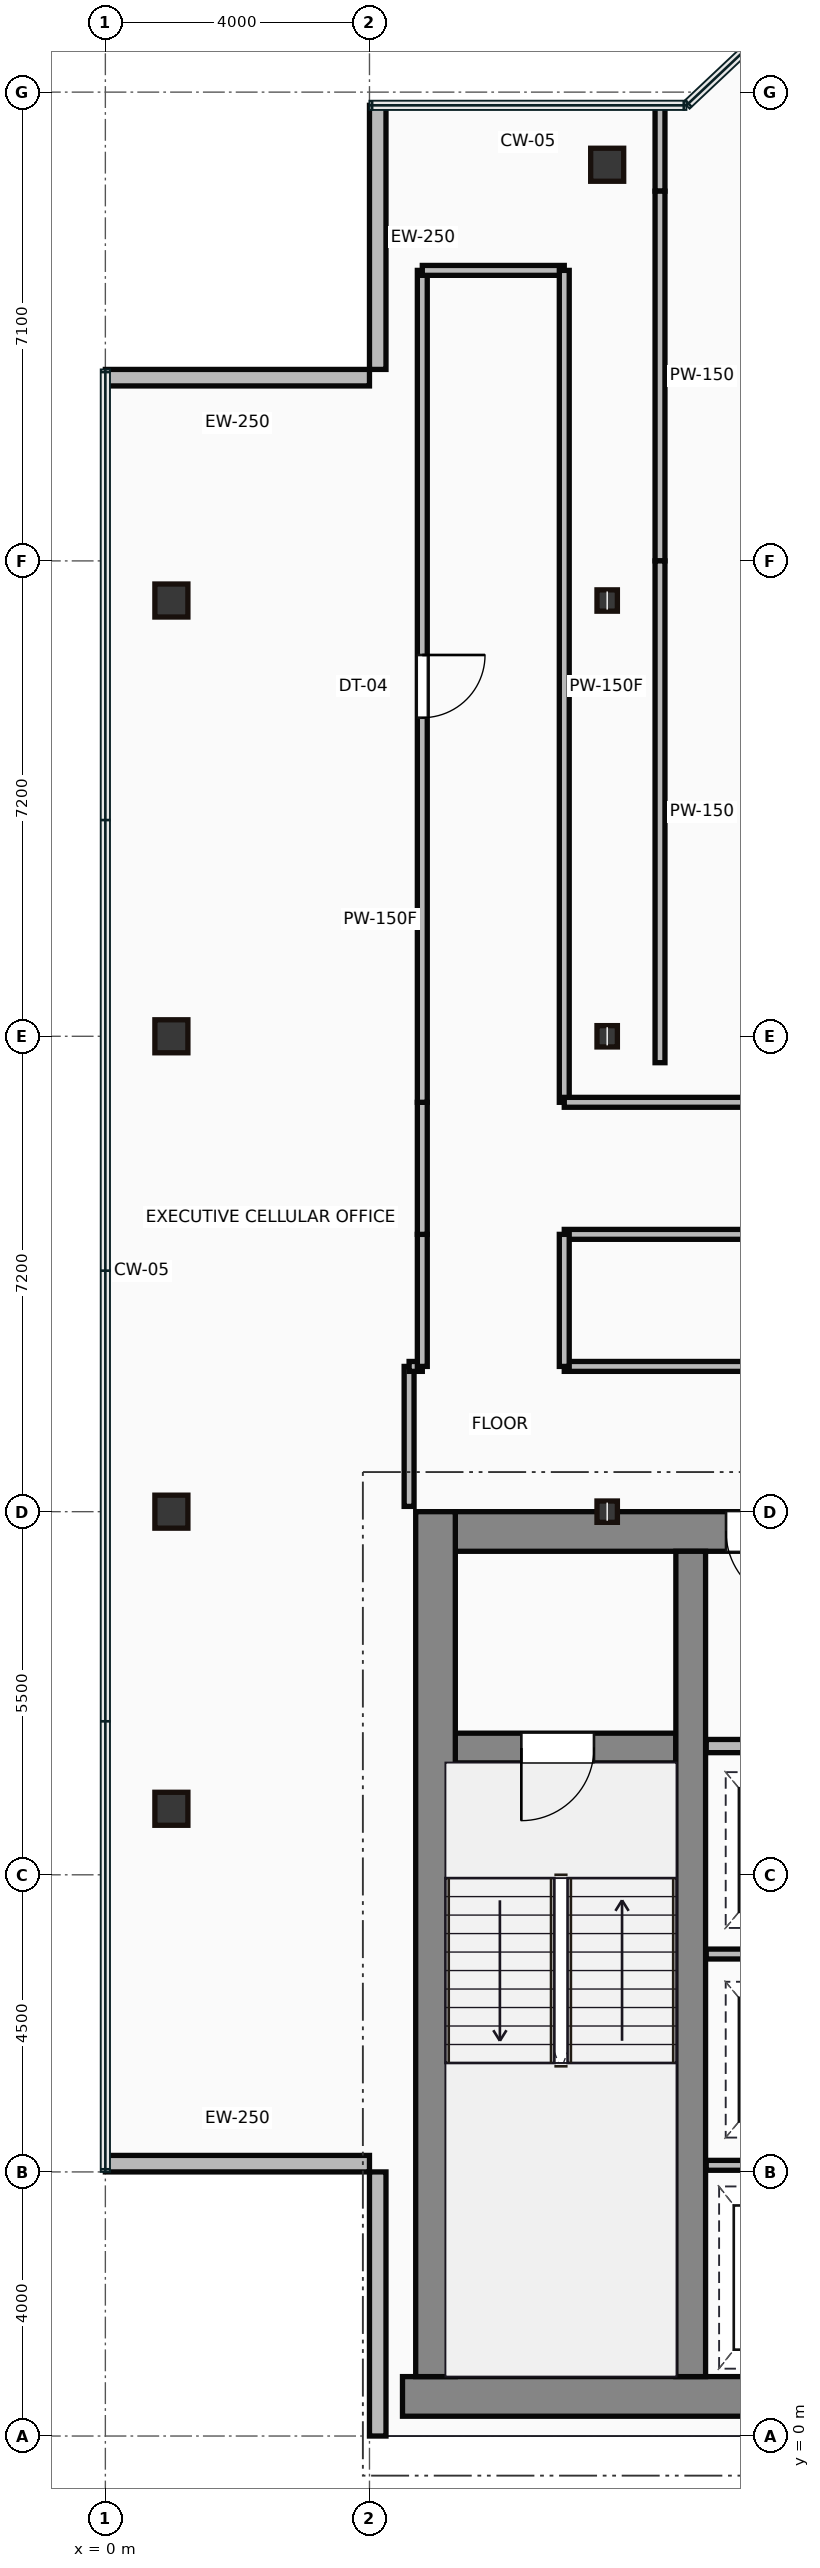
"""IFC4 building model, lengths in metres.
Left out: names, types, materials, properties, quantities, classifications, styles, units other than length and angle.
Written with IfcOpenShell. Run it as: python <this file> out.ifc"""

import sys

from ifc_helpers import new_model, si_unit, direction, frame, frame_2d, origin, origin_2d, place, context, subcontext, project, spatial, rectangle, hollow_rectangle, i_section, extrude, source, transform, mapped, element, fill, save


model = new_model("IFC4")
c1 = context("Model", 3, precision=1e-05, world=origin(), true_north=direction((0.0, 1.0)))
c2 = subcontext(c1, "Body", "Model", "MODEL_VIEW")
j1 = project(units=[si_unit("LENGTHUNIT", "METRE"), si_unit("PLANEANGLEUNIT", "RADIAN")], contexts=[c1])
p1 = place(None, origin())
s1 = spatial("IfcSite", under=j1, at=p1, CompositionType="ELEMENT")
p2 = place(p1, origin())
s2 = spatial("IfcBuilding", under=s1, at=p2, CompositionType="ELEMENT")
p3 = place(p2, frame((0.0, 0.0, 262.45)))
s3 = spatial("IfcBuildingStorey", under=s2, at=p3, CompositionType="ELEMENT", Elevation=262.45)
m1 = source(origin(), c2, "Body", "SweptSolid", [
    extrude(rectangle(XDim=29.5, YDim=0.6, at=frame_2d((14.75, 0.0))), origin(), (0.0, 0.0, 1.0), 3.65),
])
p4 = place(p3, frame((4.5, 0.6, 0.0), z_axis=(0.0, 0.0, 1.0), x_axis=(1.0, 0.0, 0.0)))
e1 = element("IfcWall", 1, at=p4, inside=s3, PredefinedType="SHEAR", context=c2, shape_type="MappedRepresentation", body=[
    mapped(m1, transform((0.0, 0.0, 0.0))),
])
m2 = source(origin(), c2, "Body", "SweptSolid", [
    extrude(rectangle(XDim=13.1, YDim=0.6, at=frame_2d((6.55, 0.0))), origin(), (0.0, 0.0, 1.0), 3.65),
])
p5 = place(p3, frame((5.0, 0.9, 0.0), z_axis=(0.0, 0.0, 1.0), x_axis=(0.0, 1.0, 0.0)))
e2 = element("IfcWall", 2, at=p5, inside=s3, PredefinedType="SHEAR", context=c2, shape_type="MappedRepresentation", body=[
    mapped(m2, transform((0.0, 0.0, 0.0))),
])
m3 = source(origin(), c2, "Body", "SweptSolid", [
    extrude(rectangle(XDim=9.1, YDim=0.6, at=frame_2d((4.55, 0.0))), origin(), (0.0, 0.0, 1.0), 3.65),
])
p6 = place(p3, frame((5.3, 13.7, 0.0), z_axis=(0.0, 0.0, 1.0), x_axis=(1.0, 0.0, 0.0)))
e3 = element("IfcWall", 3, at=p6, inside=s3, PredefinedType="SHEAR", context=c2, shape_type="MappedRepresentation", body=[
    mapped(m3, transform((0.0, 0.0, 0.0))),
])
p7 = place(p6, frame((4.1, 0.0, 0.0)))
e4 = element("IfcOpeningElement", 4, at=p7, cuts=e3, PredefinedType="OPENING", context=c2, shape_type="SweptSolid", body=[
    extrude(rectangle(XDim=1.1, YDim=2.15, at=frame_2d((0.55, 1.075))), frame((0.0, 0.31, 0.0), z_axis=(0.0, -1.0, 0.0), x_axis=(1.0, 0.0, 0.0)), (0.0, 0.0, 1.0), 0.62),
])
m4 = source(origin(), c2, "Body", "SweptSolid", [
    extrude(rectangle(XDim=12.5, YDim=0.45, at=frame_2d((6.25, 0.0))), origin(), (0.0, 0.0, 1.0), 3.65),
])
p8 = place(p3, frame((8.865, 0.9, 0.0), z_axis=(0.0, 0.0, 1.0), x_axis=(0.0, 1.0, 0.0)))
e5 = element("IfcWall", 5, at=p8, inside=s3, PredefinedType="SHEAR", context=c2, shape_type="MappedRepresentation", body=[
    mapped(m4, transform((0.0, 0.0, 0.0))),
])
m5 = source(origin(), c2, "Body", "SweptSolid", [
    extrude(rectangle(XDim=3.39, YDim=0.45, at=frame_2d((1.695, 0.0))), origin(), (0.0, 0.0, 1.0), 3.65),
])
p9 = place(p3, frame((5.25, 10.42, 0.0), z_axis=(0.0, 0.0, 1.0), x_axis=(1.0, 0.0, 0.0)))
e6 = element("IfcWall", 6, at=p9, inside=s3, PredefinedType="SHEAR", context=c2, shape_type="MappedRepresentation", body=[
    mapped(m5, transform((0.0, 0.0, 0.0))),
])
p10 = place(p9, frame((1.05, 0.0, 0.0)))
e7 = element("IfcOpeningElement", 7, at=p10, cuts=e6, PredefinedType="OPENING", context=c2, shape_type="SweptSolid", body=[
    extrude(rectangle(XDim=1.1, YDim=2.15, at=frame_2d((0.55, 1.075))), frame((0.0, 0.235, 0.0), z_axis=(0.0, -1.0, 0.0), x_axis=(1.0, 0.0, 0.0)), (0.0, 0.0, 1.0), 0.47),
])
m6 = source(origin(), c2, "Body", "SweptSolid", [
    extrude(hollow_rectangle(XDim=0.5, YDim=0.5, WallThickness=0.022, at=origin_2d()), origin(), (0.0, 0.0, 1.0), 3.65),
])
for number, where, z_axis, x_axis in (
    (8, (1.0, 9.5, 0.0), (0.0, 0.0, 1.0), (1.0, 0.0, 0.0)),
    (9, (1.0, 14.0, 0.0), (0.0, 0.0, 1.0), (1.0, 0.0, 0.0)),
    (10, (1.0, 21.2, 0.0), (0.0, 0.0, 1.0), (1.0, 0.0, 0.0)),
    (11, (1.0, 27.8, 0.0), (0.0, 0.0, 1.0), (1.0, 0.0, 0.0)),
):
    element("IfcColumn", number, at=place(p3, frame(where, z_axis=z_axis, x_axis=x_axis)), inside=s3, PredefinedType="COLUMN", context=c2, shape_type="MappedRepresentation", body=[
        mapped(m6, transform((0.0, 0.0, 0.0))),
    ])
m7 = source(origin(), c2, "Body", "SweptSolid", [
    extrude(i_section(OverallWidth=0.309, OverallDepth=0.323, WebThickness=0.014, FlangeThickness=0.023, at=origin_2d()), origin(), (0.0, 0.0, 1.0), 3.65),
])
for number, where, z_axis, x_axis in (
    (12, (7.6, 14.0, 0.0), (0.0, 0.0, 1.0), (1.0, 0.0, 0.0)),
    (13, (7.6, 21.2, 0.0), (0.0, 0.0, 1.0), (1.0, 0.0, 0.0)),
    (14, (7.6, 27.8, 0.0), (0.0, 0.0, 1.0), (1.0, 0.0, 0.0)),
):
    element("IfcColumn", number, at=place(p3, frame(where, z_axis=z_axis, x_axis=x_axis)), inside=s3, PredefinedType="COLUMN", context=c2, shape_type="MappedRepresentation", body=[
        mapped(m7, transform((0.0, 0.0, 0.0))),
    ])
p11 = place(p3, frame((7.6, 34.4, 0.0), z_axis=(0.0, 0.0, 1.0), x_axis=(1.0, 0.0, 0.0)))
e15 = element("IfcColumn", 15, at=p11, inside=s3, PredefinedType="COLUMN", context=c2, shape_type="MappedRepresentation", body=[
    mapped(m6, transform((0.0, 0.0, 0.0))),
])
m8 = source(origin(), c2, "Body", "SweptSolid", [
    extrude(rectangle(XDim=4.0, YDim=0.25, at=frame_2d((2.0, 0.0))), origin(), (0.0, 0.0, 1.0), 3.4),
])
for number, where, z_axis, x_axis in (
    (16, (4.125, 35.3, 0.0), (0.0, 0.0, 1.0), (0.0, -1.0, 0.0)),
    (17, (4.0, 31.175, 0.0), (0.0, 0.0, 1.0), (-1.0, 0.0, 0.0)),
    (18, (0.0, 4.125, 0.0), (0.0, 0.0, 1.0), (1.0, 0.0, 0.0)),
    (19, (4.125, 4.0, 0.0), (0.0, 0.0, 1.0), (0.0, -1.0, 0.0)),
):
    element("IfcWall", number, at=place(p3, frame(where, z_axis=z_axis, x_axis=x_axis)), inside=s3, PredefinedType="STANDARD", context=c2, shape_type="MappedRepresentation", body=[
        mapped(m8, transform((0.0, 0.0, 0.0))),
    ])
m9 = source(origin(), c2, "Body", "SweptSolid", [
    extrude(rectangle(XDim=2.35, YDim=0.2, at=frame_2d((1.175, 0.0))), origin(), (0.0, 0.0, 1.0), 3.4),
])
p12 = place(p3, frame((9.1, 10.45, 0.0), z_axis=(0.0, 0.0, 1.0), x_axis=(1.0, 0.0, 0.0)))
e20 = element("IfcWall", 20, at=p12, inside=s3, PredefinedType="PARTITIONING", context=c2, shape_type="MappedRepresentation", body=[
    mapped(m9, transform((0.0, 0.0, 0.0))),
])
p13 = place(p12, frame((0.55, 0.0, 0.0)))
e21 = element("IfcOpeningElement", 21, at=p13, cuts=e20, PredefinedType="OPENING", context=c2, shape_type="SweptSolid", body=[
    extrude(rectangle(XDim=1.1, YDim=2.15, at=frame_2d((0.55, 1.075))), frame((0.0, 0.11, 0.0), z_axis=(0.0, -1.0, 0.0), x_axis=(1.0, 0.0, 0.0)), (0.0, 0.0, 1.0), 0.22),
])
m10 = source(origin(), c2, "Body", "SweptSolid", [
    extrude(rectangle(XDim=2.4, YDim=0.15, at=frame_2d((1.2, 0.0))), origin(), (0.0, 0.0, 1.0), 3.4),
])
for number, where, z_axis, x_axis in (
    (22, (9.1, 4.1, 0.0), (0.0, 0.0, 1.0), (1.0, 0.0, 0.0)),
    (23, (9.1, 7.3, 0.0), (0.0, 0.0, 1.0), (1.0, 0.0, 0.0)),
):
    element("IfcWall", number, at=place(p3, frame(where, z_axis=z_axis, x_axis=x_axis)), inside=s3, PredefinedType="PARTITIONING", context=c2, shape_type="MappedRepresentation", body=[
        mapped(m10, transform((0.0, 0.0, 0.0))),
    ])
m11 = source(origin(), c2, "Body", "SweptSolid", [
    extrude(rectangle(XDim=2.12, YDim=0.15, at=frame_2d((1.06, 0.0))), origin(), (0.0, 0.0, 1.0), 3.4),
])
p14 = place(p3, frame((4.6, 14.08, 0.0), z_axis=(0.0, 0.0, 1.0), x_axis=(0.0, 1.0, 0.0)))
e24 = element("IfcWall", 24, at=p14, inside=s3, PredefinedType="PARTITIONING", context=c2, shape_type="MappedRepresentation", body=[
    mapped(m11, transform((0.0, 0.0, 0.0))),
])
m12 = source(origin(), c2, "Body", "SweptSolid", [
    extrude(rectangle(XDim=0.2, YDim=0.15, at=frame_2d((0.1, 0.0))), origin(), (0.0, 0.0, 1.0), 3.4),
])
p15 = place(p3, frame((4.6, 16.2, 0.0), z_axis=(0.0, 0.0, 1.0), x_axis=(1.0, 0.0, 0.0)))
e25 = element("IfcWall", 25, at=p15, inside=s3, PredefinedType="PARTITIONING", context=c2, shape_type="MappedRepresentation", body=[
    mapped(m12, transform((0.0, 0.0, 0.0))),
])
m13 = source(origin(), c2, "Body", "SweptSolid", [
    extrude(rectangle(XDim=2.0, YDim=0.15, at=frame_2d((1.0, 0.0))), origin(), (0.0, 0.0, 1.0), 3.4),
])
for number, where, z_axis, x_axis in (
    (26, (4.8, 16.2, 0.0), (0.0, 0.0, 1.0), (0.0, 1.0, 0.0)),
    (27, (4.8, 18.2, 0.0), (0.0, 0.0, 1.0), (0.0, 1.0, 0.0)),
):
    element("IfcWall", number, at=place(p3, frame(where, z_axis=z_axis, x_axis=x_axis)), inside=s3, PredefinedType="PARTITIONING", context=c2, shape_type="MappedRepresentation", body=[
        mapped(m13, transform((0.0, 0.0, 0.0))),
    ])
m14 = source(origin(), c2, "Body", "SweptSolid", [
    extrude(rectangle(XDim=12.6, YDim=0.15, at=frame_2d((6.3, 0.0))), origin(), (0.0, 0.0, 1.0), 3.4),
])
p16 = place(p3, frame((4.8, 20.2, 0.0), z_axis=(0.0, 0.0, 1.0), x_axis=(0.0, 1.0, 0.0)))
e28 = element("IfcWall", 28, at=p16, inside=s3, PredefinedType="PARTITIONING", context=c2, shape_type="MappedRepresentation", body=[
    mapped(m14, transform((0.0, 0.0, 0.0))),
])
p17 = place(p16, frame((5.825, 0.0, 0.0)))
e29 = element("IfcOpeningElement", 29, at=p17, cuts=e28, PredefinedType="OPENING", context=c2, shape_type="SweptSolid", body=[
    extrude(rectangle(XDim=0.95, YDim=2.15, at=frame_2d((0.475, 1.075))), frame((0.0, 0.085, 0.0), z_axis=(0.0, -1.0, 0.0), x_axis=(1.0, 0.0, 0.0)), (0.0, 0.0, 1.0), 0.17),
])
m15 = source(origin(), c2, "Body", "SweptSolid", [
    extrude(rectangle(XDim=2.15, YDim=0.15, at=frame_2d((1.075, 0.0))), origin(), (0.0, 0.0, 1.0), 3.4),
])
p18 = place(p3, frame((4.8, 32.8, 0.0), z_axis=(0.0, 0.0, 1.0), x_axis=(1.0, 0.0, 0.0)))
e30 = element("IfcWall", 30, at=p18, inside=s3, PredefinedType="PARTITIONING", context=c2, shape_type="MappedRepresentation", body=[
    mapped(m15, transform((0.0, 0.0, 0.0))),
])
p19 = place(p3, frame((6.95, 32.8, 0.0), z_axis=(0.0, 0.0, 1.0), x_axis=(0.0, -1.0, 0.0)))
e31 = element("IfcWall", 31, at=p19, inside=s3, PredefinedType="PARTITIONING", context=c2, shape_type="MappedRepresentation", body=[
    mapped(m14, transform((0.0, 0.0, 0.0))),
])
m16 = source(origin(), c2, "Body", "SweptSolid", [
    extrude(rectangle(XDim=23.25, YDim=0.15, at=frame_2d((11.625, 0.0))), origin(), (0.0, 0.0, 1.0), 3.4),
])
p20 = place(p3, frame((6.95, 20.2, 0.0), z_axis=(0.0, 0.0, 1.0), x_axis=(1.0, 0.0, 0.0)))
e32 = element("IfcWall", 32, at=p20, inside=s3, PredefinedType="PARTITIONING", context=c2, shape_type="MappedRepresentation", body=[
    mapped(m16, transform((0.0, 0.0, 0.0))),
])
p21 = place(p20, frame((9.175, 0.0, 0.0)))
e33 = element("IfcOpeningElement", 33, at=p21, cuts=e32, PredefinedType="OPENING", context=c2, shape_type="SweptSolid", body=[
    extrude(rectangle(XDim=0.95, YDim=2.15, at=frame_2d((0.475, 1.075))), frame((0.0, 0.085, 0.0), z_axis=(0.0, -1.0, 0.0), x_axis=(1.0, 0.0, 0.0)), (0.0, 0.0, 1.0), 0.17),
])
p22 = place(p3, frame((6.95, 16.2, 0.0), z_axis=(0.0, 0.0, 1.0), x_axis=(1.0, 0.0, 0.0)))
e34 = element("IfcWall", 34, at=p22, inside=s3, PredefinedType="PARTITIONING", context=c2, shape_type="MappedRepresentation", body=[
    mapped(m16, transform((0.0, 0.0, 0.0))),
])
p23 = place(p22, frame((4.38, 0.0, 0.0)))
e35 = element("IfcOpeningElement", 35, at=p23, cuts=e34, PredefinedType="OPENING", context=c2, shape_type="SweptSolid", body=[
    extrude(rectangle(XDim=0.95, YDim=2.15, at=frame_2d((0.475, 1.075))), frame((0.0, 0.085, 0.0), z_axis=(0.0, -1.0, 0.0), x_axis=(1.0, 0.0, 0.0)), (0.0, 0.0, 1.0), 0.17),
])
p24 = place(p22, frame((15.745, 0.0, 0.0)))
e36 = element("IfcOpeningElement", 36, at=p24, cuts=e34, PredefinedType="OPENING", context=c2, shape_type="SweptSolid", body=[
    extrude(rectangle(XDim=0.95, YDim=2.15, at=frame_2d((0.475, 1.075))), frame((0.0, 0.085, 0.0), z_axis=(0.0, -1.0, 0.0), x_axis=(1.0, 0.0, 0.0)), (0.0, 0.0, 1.0), 0.17),
])
p25 = place(p3, frame((30.2, 18.2, 0.0), z_axis=(0.0, 0.0, 1.0), x_axis=(-1.0, 0.0, 0.0)))
e37 = element("IfcWall", 37, at=p25, inside=s3, PredefinedType="PARTITIONING", context=c2, shape_type="MappedRepresentation", body=[
    mapped(m16, transform((0.0, 0.0, 0.0))),
])
p26 = place(p3, frame((6.95, 18.2, 0.0), z_axis=(0.0, 0.0, 1.0), x_axis=(0.0, -1.0, 0.0)))
e38 = element("IfcWall", 38, at=p26, inside=s3, PredefinedType="PARTITIONING", context=c2, shape_type="MappedRepresentation", body=[
    mapped(m13, transform((0.0, 0.0, 0.0))),
])
m17 = source(origin(), c2, "Body", "SweptSolid", [
    extrude(rectangle(XDim=1.28, YDim=0.15, at=frame_2d((0.64, 0.0))), origin(), (0.0, 0.0, 1.0), 3.4),
])
p27 = place(p3, frame((8.4, 35.28, 0.0), z_axis=(0.0, 0.0, 1.0), x_axis=(0.0, -1.0, 0.0)))
e39 = element("IfcWall", 39, at=p27, inside=s3, PredefinedType="PARTITIONING", context=c2, shape_type="MappedRepresentation", body=[
    mapped(m17, transform((0.0, 0.0, 0.0))),
])
m18 = source(origin(), c2, "Body", "SweptSolid", [
    extrude(rectangle(XDim=5.6, YDim=0.15, at=frame_2d((2.8, 0.0))), origin(), (0.0, 0.0, 1.0), 3.4),
])
p28 = place(p3, frame((8.4, 34.0, 0.0), z_axis=(0.0, 0.0, 1.0), x_axis=(0.0, -1.0, 0.0)))
e40 = element("IfcWall", 40, at=p28, inside=s3, PredefinedType="PARTITIONING", context=c2, shape_type="MappedRepresentation", body=[
    mapped(m18, transform((0.0, 0.0, 0.0))),
])
m19 = source(origin(), c2, "Body", "SweptSolid", [
    extrude(rectangle(XDim=7.6, YDim=0.15, at=frame_2d((3.8, 0.0))), origin(), (0.0, 0.0, 1.0), 3.4),
])
p29 = place(p3, frame((8.4, 28.4, 0.0), z_axis=(0.0, 0.0, 1.0), x_axis=(0.0, -1.0, 0.0)))
e41 = element("IfcWall", 41, at=p29, inside=s3, PredefinedType="PARTITIONING", context=c2, shape_type="MappedRepresentation", body=[
    mapped(m19, transform((0.0, 0.0, 0.0))),
])
m20 = source(origin(), c2, "Body", "SweptSolid", [
    extrude(rectangle(XDim=1.1, YDim=2.15, at=frame_2d((0.55, 1.075))), frame((0.0, 0.025, 0.0), z_axis=(0.0, -1.0, 0.0), x_axis=(1.0, 0.0, 0.0)), (0.0, 0.0, 1.0), 0.05),
])
p30 = place(p10, frame((1.1, 0.0, 0.0), z_axis=(0.0, 0.0, 1.0), x_axis=(-1.0, 0.0, 0.0)))
e42 = element("IfcDoor", 42, at=p30, inside=s3, OperationType="SINGLE_SWING_LEFT", PredefinedType="DOOR", context=c2, shape_type="MappedRepresentation", body=[
    mapped(m20, transform((0.0, 0.0, 0.0))),
])
fill(e7, e42)
p31 = place(p7, origin())
e43 = element("IfcDoor", 43, at=p31, inside=s3, OperationType="SINGLE_SWING_RIGHT", PredefinedType="DOOR", context=c2, shape_type="MappedRepresentation", body=[
    mapped(m20, transform((0.0, 0.0, 0.0))),
])
fill(e4, e43)
m21 = source(origin(), c2, "Body", "SweptSolid", [
    extrude(rectangle(XDim=0.95, YDim=2.15, at=frame_2d((0.475, 1.075))), frame((0.0, 0.025, 0.0), z_axis=(0.0, -1.0, 0.0), x_axis=(1.0, 0.0, 0.0)), (0.0, 0.0, 1.0), 0.05),
])
p32 = place(p17, origin())
e44 = element("IfcDoor", 44, at=p32, inside=s3, OperationType="SINGLE_SWING_RIGHT", PredefinedType="DOOR", context=c2, shape_type="MappedRepresentation", body=[
    mapped(m21, transform((0.0, 0.0, 0.0))),
])
fill(e29, e44)
save(model, sys.argv[1])
